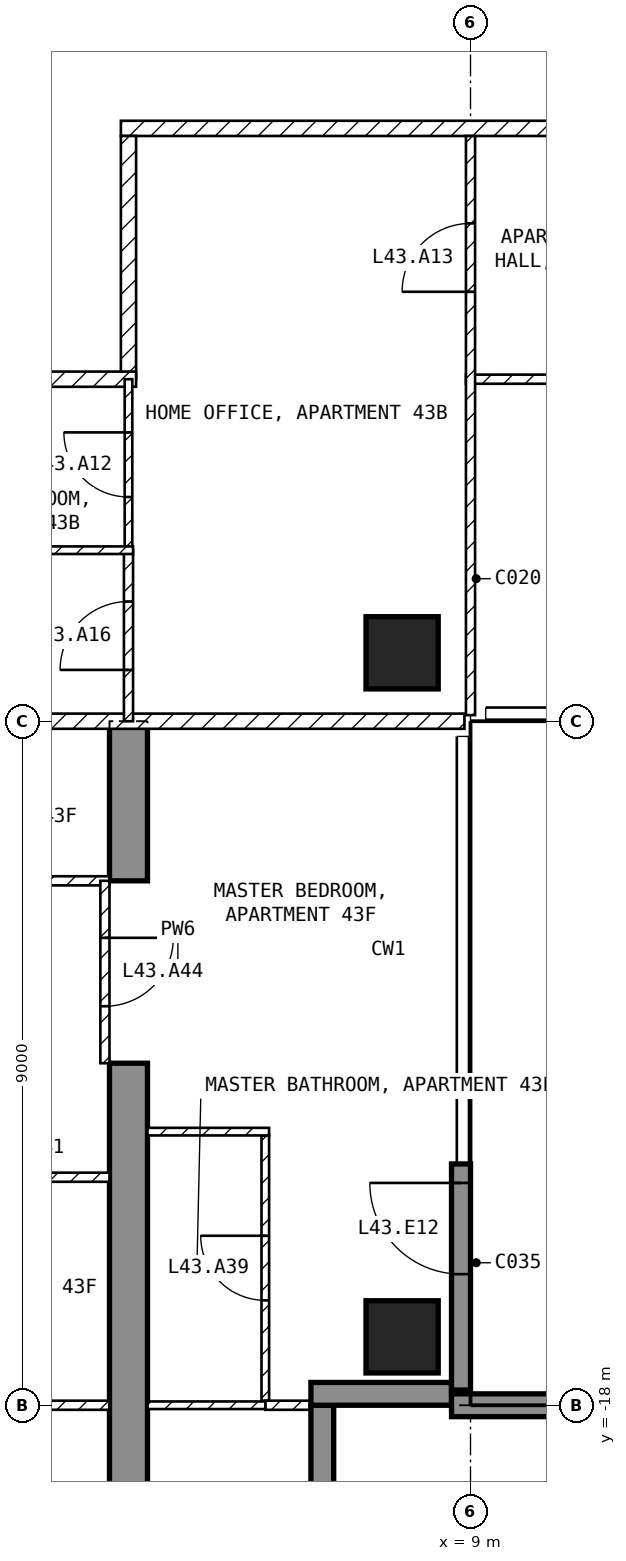
"""IFC4 building model, lengths in metres.
Left out: names, types, materials, properties, quantities, classifications, styles, units other than length and angle.
Written with IfcOpenShell. Run it as: python <this file> out.ifc"""

import sys

from ifc_helpers import new_model, si_unit, direction, frame, frame_2d, origin, origin_2d, place, context, subcontext, project, spatial, polyline, rectangle, outline, extrude, element, fill, save


model = new_model("IFC4")
c1 = context("Model", 3, precision=1e-05, world=origin(), true_north=direction((0.0, 1.0)))
c2 = subcontext(c1, "Body", "Model", "MODEL_VIEW")
j1 = project(units=[si_unit("LENGTHUNIT", "METRE"), si_unit("PLANEANGLEUNIT", "RADIAN")], contexts=[c1])
p1 = place(None, origin())
s1 = spatial("IfcSite", under=j1, at=p1, CompositionType="ELEMENT")
p2 = place(p1, origin())
s2 = spatial("IfcBuilding", under=s1, at=p2, CompositionType="ELEMENT")
p3 = place(p2, frame((0.0, 0.0, 177.1)))
s3 = spatial("IfcBuildingStorey", under=s2, at=p3, CompositionType="ELEMENT", Elevation=177.1)
for number, where, z_axis, x_axis in (
    (1, (8.1, -17.1, -0.25), (0.0, 0.0, 1.0), (1.0, 0.0, 0.0)),
    (2, (8.1, -8.1, -0.25), (0.0, 0.0, 1.0), (1.0, 0.0, 0.0)),
):
    element("IfcColumn", number, at=place(p3, frame(where, z_axis=z_axis, x_axis=x_axis)), inside=s3, PredefinedType="COLUMN", context=c2, shape_type="SweptSolid", body=[
        extrude(rectangle(XDim=0.95, YDim=0.95, at=origin_2d()), origin(), (0.0, 0.0, 1.0), 3.5),
    ])
p4 = place(p3, frame((4.25, -20.225, -0.25), z_axis=(1.0, 0.0, 0.0), x_axis=(0.0, 1.0, 0.0)))
e3 = element("IfcWall", 3, at=p4, inside=s3, PredefinedType="SHEAR", context=c2, shape_type="SweptSolid", body=[
    extrude(outline(polyline([(0.0, 0.0), (6.725, 0.0), (6.725, 2.65), (9.125, 2.65), (9.125, 0.0), (11.225, 0.0), (11.225, 3.5), (0.0, 3.5), (0.0, 0.0)])), origin(), (0.0, 0.0, 1.0), 0.5),
])
p5 = place(p3, frame((8.875, -17.8, 0.0), z_axis=(0.0, 0.0, 1.0), x_axis=(0.0, 1.0, 0.0)))
e4 = element("IfcWall", 4, at=p5, inside=s3, PredefinedType="SOLIDWALL", context=c2, shape_type="SweptSolid", body=[
    extrude(rectangle(XDim=2.975, YDim=0.25, at=frame_2d((1.488, 0.0))), origin(), (0.0, 0.0, 1.0), 3.25),
])
p6 = place(p5, frame((1.525, 0.0, 0.0)))
e5 = element("IfcOpeningElement", 5, at=p6, cuts=e4, PredefinedType="OPENING", context=c2, shape_type="SweptSolid", body=[
    extrude(rectangle(XDim=1.2, YDim=2.4, at=frame_2d((0.6, 1.2))), frame((0.0, 0.135, 0.0), z_axis=(0.0, -1.0, 0.0), x_axis=(1.0, 0.0, 0.0)), (0.0, 0.0, 1.0), 0.27),
])
p7 = place(p3, frame((7.05, -19.8, 0.0), z_axis=(0.0, 0.0, 1.0), x_axis=(0.0, 1.0, 0.0)))
e6 = element("IfcWall", 6, at=p7, inside=s3, PredefinedType="SOLIDWALL", context=c2, shape_type="SweptSolid", body=[
    extrude(rectangle(XDim=1.8, YDim=0.3, at=frame_2d((0.9, 0.0))), origin(), (0.0, 0.0, 1.0), 3.25),
])
p8 = place(p3, frame((6.9, -17.85, 0.0), z_axis=(0.0, 0.0, 1.0), x_axis=(1.0, 0.0, 0.0)))
e7 = element("IfcWall", 7, at=p8, inside=s3, PredefinedType="SOLIDWALL", context=c2, shape_type="SweptSolid", body=[
    extrude(rectangle(XDim=1.85, YDim=0.3, at=frame_2d((0.925, 0.0))), origin(), (0.0, 0.0, 1.0), 3.25),
])
p9 = place(p3, frame((8.75, -18.0, 0.0), z_axis=(0.0, 0.0, 1.0), x_axis=(1.0, 0.0, 0.0)))
e8 = element("IfcWall", 8, at=p9, inside=s3, PredefinedType="SOLIDWALL", context=c2, shape_type="SweptSolid", body=[
    extrude(rectangle(XDim=2.95, YDim=0.3, at=frame_2d((1.475, 0.0))), origin(), (0.0, 0.0, 1.0), 3.25),
])
p10 = place(p3, frame((21.6, -1.2, 0.0), z_axis=(0.0, 0.0, 1.0), x_axis=(-1.0, 0.0, 0.0)))
e9 = element("IfcWall", 9, at=p10, inside=s3, PredefinedType="PARTITIONING", context=c2, shape_type="SweptSolid", body=[
    extrude(rectangle(XDim=17.2, YDim=0.2, at=frame_2d((8.6, 0.0))), origin(), (0.0, 0.0, 1.0), 3.25),
])
p11 = place(p10, frame((10.3, 0.0, 0.0)))
e10 = element("IfcOpeningElement", 10, at=p11, cuts=e9, PredefinedType="OPENING", context=c2, shape_type="SweptSolid", body=[
    extrude(rectangle(XDim=1.0, YDim=2.1, at=frame_2d((0.5, 1.05))), frame((0.0, 0.11, 0.0), z_axis=(0.0, -1.0, 0.0), x_axis=(1.0, 0.0, 0.0)), (0.0, 0.0, 1.0), 0.22),
])
p12 = place(p3, frame((4.5, -1.3, 0.0), z_axis=(0.0, 0.0, 1.0), x_axis=(0.0, -1.0, 0.0)))
e11 = element("IfcWall", 11, at=p12, inside=s3, PredefinedType="PARTITIONING", context=c2, shape_type="SweptSolid", body=[
    extrude(rectangle(XDim=3.2, YDim=0.2, at=frame_2d((1.6, 0.0))), origin(), (0.0, 0.0, 1.0), 3.25),
])
p13 = place(p3, frame((4.6, -4.5, 0.0), z_axis=(0.0, 0.0, 1.0), x_axis=(-1.0, 0.0, 0.0)))
e12 = element("IfcWall", 12, at=p13, inside=s3, PredefinedType="PARTITIONING", context=c2, shape_type="SweptSolid", body=[
    extrude(rectangle(XDim=3.5, YDim=0.2, at=frame_2d((1.75, 0.0))), origin(), (0.0, 0.0, 1.0), 3.25),
])
p14 = place(p3, frame((8.92, -9.0, 0.0), z_axis=(0.0, 0.0, 1.0), x_axis=(-1.0, 0.0, 0.0)))
e13 = element("IfcWall", 13, at=p14, inside=s3, PredefinedType="PARTITIONING", context=c2, shape_type="SweptSolid", body=[
    extrude(rectangle(XDim=17.84, YDim=0.2, at=frame_2d((8.92, 0.0))), origin(), (0.0, 0.0, 1.0), 3.25),
])
p15 = place(p14, frame((8.42, 0.0, 0.0)))
e14 = element("IfcOpeningElement", 14, at=p15, cuts=e13, PredefinedType="OPENING", context=c2, shape_type="SweptSolid", body=[
    extrude(rectangle(XDim=1.0, YDim=2.1, at=frame_2d((0.5, 1.05))), frame((0.0, 0.11, 0.0), z_axis=(0.0, -1.0, 0.0), x_axis=(1.0, 0.0, 0.0)), (0.0, 0.0, 1.0), 0.22),
])
p16 = place(p3, frame((17.4, -4.5, 0.0), z_axis=(0.0, 0.0, 1.0), x_axis=(-1.0, 0.0, 0.0)))
e15 = element("IfcWall", 15, at=p16, inside=s3, PredefinedType="PARTITIONING", context=c2, shape_type="SweptSolid", body=[
    extrude(rectangle(XDim=8.46, YDim=0.12, at=frame_2d((4.23, 0.0))), origin(), (0.0, 0.0, 1.0), 3.25),
])
p17 = place(p16, frame((0.45, 0.0, 0.0)))
e16 = element("IfcOpeningElement", 16, at=p17, cuts=e15, PredefinedType="OPENING", context=c2, shape_type="SweptSolid", body=[
    extrude(rectangle(XDim=0.9, YDim=2.1, at=frame_2d((0.45, 1.05))), frame((0.0, 0.07, 0.0), z_axis=(0.0, -1.0, 0.0), x_axis=(1.0, 0.0, 0.0)), (0.0, 0.0, 1.0), 0.14),
])
p18 = place(p16, frame((6.15, 0.0, 0.0)))
e17 = element("IfcOpeningElement", 17, at=p18, cuts=e15, PredefinedType="OPENING", context=c2, shape_type="SweptSolid", body=[
    extrude(rectangle(XDim=0.9, YDim=2.1, at=frame_2d((0.45, 1.05))), frame((0.0, 0.07, 0.0), z_axis=(0.0, -1.0, 0.0), x_axis=(1.0, 0.0, 0.0)), (0.0, 0.0, 1.0), 0.14),
])
p19 = place(p3, frame((9.0, -8.92, 0.0), z_axis=(0.0, 0.0, 1.0), x_axis=(0.0, 1.0, 0.0)))
e18 = element("IfcWall", 18, at=p19, inside=s3, PredefinedType="PARTITIONING", context=c2, shape_type="SweptSolid", body=[
    extrude(rectangle(XDim=7.62, YDim=0.12, at=frame_2d((3.81, 0.0))), origin(), (0.0, 0.0, 1.0), 3.25),
])
p20 = place(p19, frame((5.57, 0.0, 0.0)))
e19 = element("IfcOpeningElement", 19, at=p20, cuts=e18, PredefinedType="OPENING", context=c2, shape_type="SweptSolid", body=[
    extrude(rectangle(XDim=0.9, YDim=2.1, at=frame_2d((0.45, 1.05))), frame((0.0, 0.07, 0.0), z_axis=(0.0, -1.0, 0.0), x_axis=(1.0, 0.0, 0.0)), (0.0, 0.0, 1.0), 0.14),
])
p21 = place(p3, frame((4.5, -6.75, 0.0), z_axis=(0.0, 0.0, 1.0), x_axis=(0.0, 1.0, 0.0)))
e20 = element("IfcWall", 20, at=p21, inside=s3, PredefinedType="PARTITIONING", context=c2, shape_type="SweptSolid", body=[
    extrude(rectangle(XDim=2.25, YDim=0.1, at=frame_2d((1.125, 0.0))), origin(), (0.0, 0.0, 1.0), 3.25),
])
p22 = place(p21, frame((0.7, 0.0, 0.0)))
e21 = element("IfcOpeningElement", 21, at=p22, cuts=e20, PredefinedType="OPENING", context=c2, shape_type="SweptSolid", body=[
    extrude(rectangle(XDim=0.85, YDim=2.1, at=frame_2d((0.425, 1.05))), frame((0.0, 0.06, 0.0), z_axis=(0.0, -1.0, 0.0), x_axis=(1.0, 0.0, 0.0)), (0.0, 0.0, 1.0), 0.12),
])
p23 = place(p3, frame((4.5, -9.0, 0.0), z_axis=(0.0, 0.0, 1.0), x_axis=(0.0, 1.0, 0.0)))
e22 = element("IfcWall", 22, at=p23, inside=s3, PredefinedType="PARTITIONING", context=c2, shape_type="SweptSolid", body=[
    extrude(rectangle(XDim=2.25, YDim=0.12, at=frame_2d((1.125, 0.0))), origin(), (0.0, 0.0, 1.0), 3.25),
])
p24 = place(p23, frame((0.675, 0.0, 0.0)))
e23 = element("IfcOpeningElement", 23, at=p24, cuts=e22, PredefinedType="OPENING", context=c2, shape_type="SweptSolid", body=[
    extrude(rectangle(XDim=0.9, YDim=2.1, at=frame_2d((0.45, 1.05))), frame((0.0, 0.07, 0.0), z_axis=(0.0, -1.0, 0.0), x_axis=(1.0, 0.0, 0.0)), (0.0, 0.0, 1.0), 0.14),
])
p25 = place(p3, frame((4.56, -6.75, 0.0), z_axis=(0.0, 0.0, 1.0), x_axis=(-1.0, 0.0, 0.0)))
e24 = element("IfcWall", 24, at=p25, inside=s3, PredefinedType="PARTITIONING", context=c2, shape_type="SweptSolid", body=[
    extrude(rectangle(XDim=3.46, YDim=0.1, at=frame_2d((1.73, 0.0))), origin(), (0.0, 0.0, 1.0), 3.25),
])
p26 = place(p3, frame((4.25, -11.1, 0.0), z_axis=(0.0, 0.0, 1.0), x_axis=(-1.0, 0.0, 0.0)))
e25 = element("IfcWall", 25, at=p26, inside=s3, PredefinedType="PARTITIONING", context=c2, shape_type="SweptSolid", body=[
    extrude(rectangle(XDim=6.35, YDim=0.12, at=frame_2d((3.175, 0.0))), origin(), (0.0, 0.0, 1.0), 3.25),
])
p27 = place(p26, frame((2.725, 0.0, 0.0)))
e26 = element("IfcOpeningElement", 26, at=p27, cuts=e25, PredefinedType="OPENING", context=c2, shape_type="SweptSolid", body=[
    extrude(rectangle(XDim=0.9, YDim=2.1, at=frame_2d((0.45, 1.05))), frame((0.0, 0.07, 0.0), z_axis=(0.0, -1.0, 0.0), x_axis=(1.0, 0.0, 0.0)), (0.0, 0.0, 1.0), 0.14),
])
p28 = place(p3, frame((4.25, -15.0, 0.0), z_axis=(0.0, 0.0, 1.0), x_axis=(-1.0, 0.0, 0.0)))
e27 = element("IfcWall", 27, at=p28, inside=s3, PredefinedType="PARTITIONING", context=c2, shape_type="SweptSolid", body=[
    extrude(rectangle(XDim=3.81, YDim=0.12, at=frame_2d((1.905, 0.0))), origin(), (0.0, 0.0, 1.0), 3.25),
])
p29 = place(p28, frame((1.425, 0.0, 0.0)))
e28 = element("IfcOpeningElement", 28, at=p29, cuts=e27, PredefinedType="OPENING", context=c2, shape_type="SweptSolid", body=[
    extrude(rectangle(XDim=0.9, YDim=2.1, at=frame_2d((0.45, 1.05))), frame((0.0, 0.07, 0.0), z_axis=(0.0, -1.0, 0.0), x_axis=(1.0, 0.0, 0.0)), (0.0, 0.0, 1.0), 0.14),
])
p30 = place(p3, frame((4.25, -18.0, 0.0), z_axis=(0.0, 0.0, 1.0), x_axis=(-1.0, 0.0, 0.0)))
e29 = element("IfcWall", 29, at=p30, inside=s3, PredefinedType="PARTITIONING", context=c2, shape_type="SweptSolid", body=[
    extrude(rectangle(XDim=8.5, YDim=0.12, at=frame_2d((4.25, 0.0))), origin(), (0.0, 0.0, 1.0), 3.25),
])
p31 = place(p30, frame((5.675, 0.0, 0.0)))
e30 = element("IfcOpeningElement", 30, at=p31, cuts=e29, PredefinedType="OPENING", context=c2, shape_type="SweptSolid", body=[
    extrude(rectangle(XDim=0.9, YDim=2.1, at=frame_2d((0.45, 1.05))), frame((0.0, 0.07, 0.0), z_axis=(0.0, -1.0, 0.0), x_axis=(1.0, 0.0, 0.0)), (0.0, 0.0, 1.0), 0.14),
])
p32 = place(p3, frame((6.3, -17.94, 0.0), z_axis=(0.0, 0.0, 1.0), x_axis=(0.0, 1.0, 0.0)))
e31 = element("IfcWall", 31, at=p32, inside=s3, PredefinedType="PARTITIONING", context=c2, shape_type="SweptSolid", body=[
    extrude(rectangle(XDim=3.49, YDim=0.1, at=frame_2d((1.745, 0.0))), origin(), (0.0, 0.0, 1.0), 3.25),
])
p33 = place(p32, frame((1.32, 0.0, 0.0)))
e32 = element("IfcOpeningElement", 32, at=p33, cuts=e31, PredefinedType="OPENING", context=c2, shape_type="SweptSolid", body=[
    extrude(rectangle(XDim=0.85, YDim=2.1, at=frame_2d((0.425, 1.05))), frame((0.0, 0.06, 0.0), z_axis=(0.0, -1.0, 0.0), x_axis=(1.0, 0.0, 0.0)), (0.0, 0.0, 1.0), 0.12),
])
p34 = place(p3, frame((6.35, -14.4, 0.0), z_axis=(0.0, 0.0, 1.0), x_axis=(-1.0, 0.0, 0.0)))
e33 = element("IfcWall", 33, at=p34, inside=s3, PredefinedType="PARTITIONING", context=c2, shape_type="SweptSolid", body=[
    extrude(rectangle(XDim=1.6, YDim=0.1, at=frame_2d((0.8, 0.0))), origin(), (0.0, 0.0, 1.0), 3.25),
])
p35 = place(p3, frame((7.12, -18.0, 0.0), z_axis=(0.0, 0.0, 1.0), x_axis=(-1.0, 0.0, 0.0)))
e34 = element("IfcWall", 34, at=p35, inside=s3, PredefinedType="PARTITIONING", context=c2, shape_type="SweptSolid", body=[
    extrude(rectangle(XDim=0.82, YDim=0.12, at=frame_2d((0.41, 0.0))), origin(), (0.0, 0.0, 1.0), 3.25),
])
p36 = place(p3, frame((6.3, -18.0, 0.0), z_axis=(0.0, 0.0, 1.0), x_axis=(-1.0, 0.0, 0.0)))
e35 = element("IfcWall", 35, at=p36, inside=s3, PredefinedType="PARTITIONING", context=c2, shape_type="SweptSolid", body=[
    extrude(rectangle(XDim=1.55, YDim=0.1, at=frame_2d((0.775, 0.0))), origin(), (0.0, 0.0, 1.0), 3.25),
])
p37 = place(p3, frame((4.19, -11.1, 0.0), z_axis=(0.0, 0.0, 1.0), x_axis=(0.0, -1.0, 0.0)))
e36 = element("IfcWall", 36, at=p37, inside=s3, PredefinedType="PARTITIONING", context=c2, shape_type="SweptSolid", body=[
    extrude(rectangle(XDim=2.4, YDim=0.12, at=frame_2d((1.2, 0.0))), origin(), (0.0, 0.0, 1.0), 2.4),
])
p38 = place(p37, frame((0.75, 0.0, 0.0)))
e37 = element("IfcOpeningElement", 37, at=p38, cuts=e36, PredefinedType="OPENING", context=c2, shape_type="SweptSolid", body=[
    extrude(rectangle(XDim=0.9, YDim=2.1, at=frame_2d((0.45, 1.05))), frame((0.0, 0.07, 0.0), z_axis=(0.0, -1.0, 0.0), x_axis=(1.0, 0.0, 0.0)), (0.0, 0.0, 1.0), 0.14),
])
p39 = place(p6, origin())
e38 = element("IfcDoor", 38, at=p39, inside=s3, OperationType="SINGLE_SWING_RIGHT", PredefinedType="DOOR", context=c2, shape_type="SweptSolid", body=[
    extrude(rectangle(XDim=1.2, YDim=2.4, at=frame_2d((0.6, 1.2))), frame((0.0, 0.025, 0.0), z_axis=(0.0, -1.0, 0.0), x_axis=(1.0, 0.0, 0.0)), (0.0, 0.0, 1.0), 0.05),
])
fill(e5, e38)
p40 = place(p22, origin())
e39 = element("IfcDoor", 39, at=p40, inside=s3, OperationType="SINGLE_SWING_RIGHT", PredefinedType="DOOR", context=c2, shape_type="SweptSolid", body=[
    extrude(rectangle(XDim=0.85, YDim=2.1, at=frame_2d((0.425, 1.05))), frame((0.0, 0.025, 0.0), z_axis=(0.0, -1.0, 0.0), x_axis=(1.0, 0.0, 0.0)), (0.0, 0.0, 1.0), 0.05),
])
fill(e21, e39)
p41 = place(p20, origin())
e40 = element("IfcDoor", 40, at=p41, inside=s3, OperationType="SINGLE_SWING_LEFT", PredefinedType="DOOR", context=c2, shape_type="SweptSolid", body=[
    extrude(rectangle(XDim=0.9, YDim=2.1, at=frame_2d((0.45, 1.05))), frame((0.0, 0.025, 0.0), z_axis=(0.0, -1.0, 0.0), x_axis=(1.0, 0.0, 0.0)), (0.0, 0.0, 1.0), 0.05),
])
fill(e19, e40)
p42 = place(p24, origin())
e41 = element("IfcDoor", 41, at=p42, inside=s3, OperationType="SINGLE_SWING_LEFT", PredefinedType="DOOR", context=c2, shape_type="SweptSolid", body=[
    extrude(rectangle(XDim=0.9, YDim=2.1, at=frame_2d((0.45, 1.05))), frame((0.0, 0.025, 0.0), z_axis=(0.0, -1.0, 0.0), x_axis=(1.0, 0.0, 0.0)), (0.0, 0.0, 1.0), 0.05),
])
fill(e23, e41)
p43 = place(p33, origin())
e42 = element("IfcDoor", 42, at=p43, inside=s3, OperationType="SINGLE_SWING_RIGHT", PredefinedType="DOOR", context=c2, shape_type="SweptSolid", body=[
    extrude(rectangle(XDim=0.85, YDim=2.1, at=frame_2d((0.425, 1.05))), frame((0.0, 0.025, 0.0), z_axis=(0.0, -1.0, 0.0), x_axis=(1.0, 0.0, 0.0)), (0.0, 0.0, 1.0), 0.05),
])
fill(e32, e42)
p44 = place(p38, origin())
e43 = element("IfcDoor", 43, at=p44, inside=s3, OperationType="SINGLE_SWING_LEFT", PredefinedType="DOOR", context=c2, shape_type="SweptSolid", body=[
    extrude(rectangle(XDim=0.9, YDim=2.1, at=frame_2d((0.45, 1.05))), frame((0.0, 0.025, 0.0), z_axis=(0.0, -1.0, 0.0), x_axis=(1.0, 0.0, 0.0)), (0.0, 0.0, 1.0), 0.05),
])
fill(e37, e43)
save(model, sys.argv[1])
